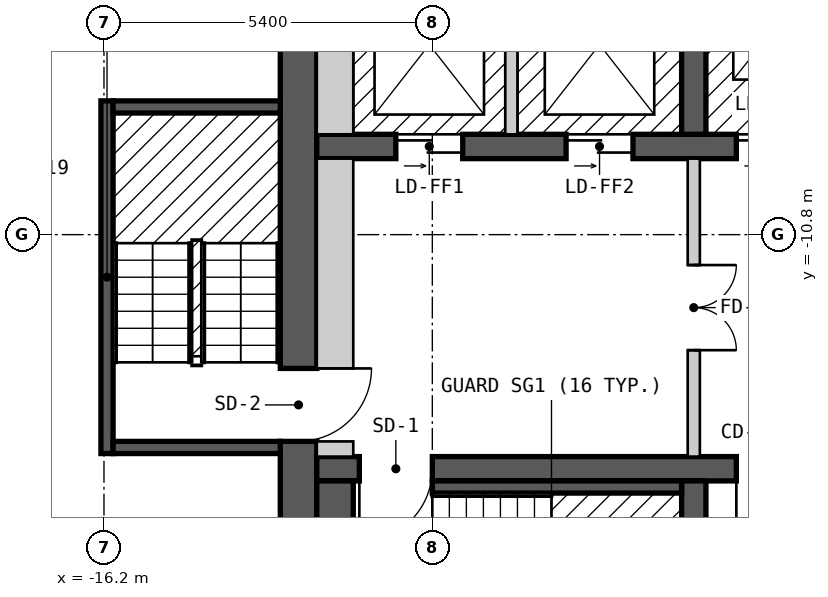
"""IFC4 building model, lengths in metres.
Left out: names, types, materials, properties, quantities, classifications, styles, units other than length and angle.
Written with IfcOpenShell. Run it as: python <this file> out.ifc"""

import sys

from ifc_helpers import new_model, si_unit, direction, frame, frame_2d, origin, origin_2d, place, context, subcontext, project, spatial, polyline, rectangle, outline, extrude, element, fill, save


model = new_model("IFC4")
c1 = context("Model", 3, precision=1e-05, world=origin(), true_north=direction((0.0, 1.0)))
c2 = subcontext(c1, "Body", "Model", "MODEL_VIEW")
j1 = project(units=[si_unit("LENGTHUNIT", "METRE"), si_unit("PLANEANGLEUNIT", "RADIAN")], contexts=[c1])
p1 = place(None, origin())
s1 = spatial("IfcSite", under=j1, at=p1, CompositionType="ELEMENT")
p2 = place(p1, origin())
s2 = spatial("IfcBuilding", under=s1, at=p2, CompositionType="ELEMENT")
p3 = place(p2, frame((0.0, 0.0, 172.2)))
s3 = spatial("IfcBuildingStorey", under=s2, at=p3, CompositionType="ELEMENT", Elevation=172.2)
p4 = place(p3, frame((-17.53, -15.736, 0.0), z_axis=(0.0, 0.0, 1.0), x_axis=(0.5, -0.866025403784, 0.0)))
e1 = element("IfcColumn", 1, at=p4, inside=s3, PredefinedType="COLUMN", context=c2, shape_type="SweptSolid", body=[
    extrude(rectangle(XDim=0.8, YDim=0.8, at=origin_2d()), origin(), (0.0, 0.0, 1.0), 3.0),
])
p5 = place(p3, frame((-13.0, -18.4, 0.0), z_axis=(0.0, 0.0, 1.0), x_axis=(0.0, 1.0, 0.0)))
e2 = element("IfcWall", 2, at=p5, inside=s3, PredefinedType="SHEAR", context=c2, shape_type="SweptSolid", body=[
    extrude(rectangle(XDim=12.8, YDim=0.6, at=frame_2d((6.4, 0.0))), origin(), (0.0, 0.0, 1.0), 2.7),
])
p6 = place(p5, frame((4.2, 0.0, 0.0)))
e3 = element("IfcOpeningElement", 3, at=p6, cuts=e2, PredefinedType="OPENING", context=c2, shape_type="SweptSolid", body=[
    extrude(rectangle(XDim=1.2, YDim=2.1, at=frame_2d((0.6, 1.05))), frame((0.0, 0.31, 0.0), z_axis=(0.0, -1.0, 0.0), x_axis=(1.0, 0.0, 0.0)), (0.0, 0.0, 1.0), 0.62),
])
p7 = place(p3, frame((-12.7, -14.65, 0.0), z_axis=(0.0, 0.0, 1.0), x_axis=(1.0, 0.0, 0.0)))
e4 = element("IfcWall", 4, at=p7, inside=s3, PredefinedType="SHEAR", context=c2, shape_type="SweptSolid", body=[
    extrude(rectangle(XDim=25.4, YDim=0.4, at=frame_2d((12.7, 0.0))), origin(), (0.0, 0.0, 1.0), 2.7),
])
p8 = place(p7, frame((1.9, 0.0, 0.0), z_axis=(0.0, 0.0, 1.0), x_axis=(-1.0, 0.0, 0.0)))
e5 = element("IfcOpeningElement", 5, at=p8, cuts=e4, PredefinedType="OPENING", context=c2, shape_type="SweptSolid", body=[
    extrude(rectangle(XDim=1.2, YDim=2.1, at=frame_2d((0.6, 1.05))), frame((0.0, 0.21, 0.0), z_axis=(0.0, -1.0, 0.0), x_axis=(1.0, 0.0, 0.0)), (0.0, 0.0, 1.0), 0.42),
])
p9 = place(p7, frame((24.75, 0.0, 0.0), z_axis=(0.0, 0.0, 1.0), x_axis=(-1.0, 0.0, 0.0)))
e6 = element("IfcOpeningElement", 6, at=p9, cuts=e4, PredefinedType="OPENING", context=c2, shape_type="SweptSolid", body=[
    extrude(rectangle(XDim=1.2, YDim=2.1, at=frame_2d((0.6, 1.05))), frame((0.0, 0.21, 0.0), z_axis=(0.0, -1.0, 0.0), x_axis=(1.0, 0.0, 0.0)), (0.0, 0.0, 1.0), 0.42),
])
p10 = place(p7, frame((7.8, 0.0, 0.0), z_axis=(0.0, 0.0, 1.0), x_axis=(-1.0, 0.0, 0.0)))
e7 = element("IfcOpeningElement", 7, at=p10, cuts=e4, PredefinedType="OPENING", context=c2, shape_type="SweptSolid", body=[
    extrude(rectangle(XDim=0.9, YDim=2.1, at=frame_2d((0.45, 1.05))), frame((0.0, 0.21, 0.0), z_axis=(0.0, -1.0, 0.0), x_axis=(1.0, 0.0, 0.0)), (0.0, 0.0, 1.0), 0.42),
])
p11 = place(p7, frame((9.85, 0.0, 0.0), z_axis=(0.0, 0.0, 1.0), x_axis=(-1.0, 0.0, 0.0)))
e8 = element("IfcOpeningElement", 8, at=p11, cuts=e4, PredefinedType="OPENING", context=c2, shape_type="SweptSolid", body=[
    extrude(rectangle(XDim=0.9, YDim=2.1, at=frame_2d((0.45, 1.05))), frame((0.0, 0.21, 0.0), z_axis=(0.0, -1.0, 0.0), x_axis=(1.0, 0.0, 0.0)), (0.0, 0.0, 1.0), 0.42),
])
p12 = place(p7, frame((12.15, 0.0, 0.0), z_axis=(0.0, 0.0, 1.0), x_axis=(-1.0, 0.0, 0.0)))
e9 = element("IfcOpeningElement", 9, at=p12, cuts=e4, PredefinedType="OPENING", context=c2, shape_type="SweptSolid", body=[
    extrude(rectangle(XDim=1.0, YDim=2.1, at=frame_2d((0.5, 1.05))), frame((0.0, 0.21, 0.0), z_axis=(0.0, -1.0, 0.0), x_axis=(1.0, 0.0, 0.0)), (0.0, 0.0, 1.0), 0.42),
])
p13 = place(p7, frame((14.35, 0.0, 0.0), z_axis=(0.0, 0.0, 1.0), x_axis=(-1.0, 0.0, 0.0)))
e10 = element("IfcOpeningElement", 10, at=p13, cuts=e4, PredefinedType="OPENING", context=c2, shape_type="SweptSolid", body=[
    extrude(rectangle(XDim=0.9, YDim=2.1, at=frame_2d((0.45, 1.05))), frame((0.0, 0.21, 0.0), z_axis=(0.0, -1.0, 0.0), x_axis=(1.0, 0.0, 0.0)), (0.0, 0.0, 1.0), 0.42),
])
p14 = place(p7, frame((16.35, 0.0, 0.0), z_axis=(0.0, 0.0, 1.0), x_axis=(-1.0, 0.0, 0.0)))
e11 = element("IfcOpeningElement", 11, at=p14, cuts=e4, PredefinedType="OPENING", context=c2, shape_type="SweptSolid", body=[
    extrude(rectangle(XDim=0.9, YDim=2.1, at=frame_2d((0.45, 1.05))), frame((0.0, 0.21, 0.0), z_axis=(0.0, -1.0, 0.0), x_axis=(1.0, 0.0, 0.0)), (0.0, 0.0, 1.0), 0.42),
])
p15 = place(p7, frame((18.5, 0.0, 0.0), z_axis=(0.0, 0.0, 1.0), x_axis=(-1.0, 0.0, 0.0)))
e12 = element("IfcOpeningElement", 12, at=p15, cuts=e4, PredefinedType="OPENING", context=c2, shape_type="SweptSolid", body=[
    extrude(rectangle(XDim=1.0, YDim=2.1, at=frame_2d((0.5, 1.05))), frame((0.0, 0.21, 0.0), z_axis=(0.0, -1.0, 0.0), x_axis=(1.0, 0.0, 0.0)), (0.0, 0.0, 1.0), 0.42),
])
p16 = place(p3, frame((-12.7, -9.35, 0.0), z_axis=(0.0, 0.0, 1.0), x_axis=(1.0, 0.0, 0.0)))
e13 = element("IfcWall", 13, at=p16, inside=s3, PredefinedType="SHEAR", context=c2, shape_type="SweptSolid", body=[
    extrude(rectangle(XDim=22.9, YDim=0.4, at=frame_2d((11.45, 0.0))), origin(), (0.0, 0.0, 1.0), 2.7),
])
p17 = place(p16, frame((1.3, 0.0, 0.0)))
e14 = element("IfcOpeningElement", 14, at=p17, cuts=e13, PredefinedType="OPENING", context=c2, shape_type="SweptSolid", body=[
    extrude(rectangle(XDim=1.1, YDim=2.1, at=frame_2d((0.55, 1.05))), frame((0.0, 0.21, 0.0), z_axis=(0.0, -1.0, 0.0), x_axis=(1.0, 0.0, 0.0)), (0.0, 0.0, 1.0), 0.42),
])
p18 = place(p16, frame((4.1, 0.0, 0.0)))
e15 = element("IfcOpeningElement", 15, at=p18, cuts=e13, PredefinedType="OPENING", context=c2, shape_type="SweptSolid", body=[
    extrude(rectangle(XDim=1.1, YDim=2.1, at=frame_2d((0.55, 1.05))), frame((0.0, 0.21, 0.0), z_axis=(0.0, -1.0, 0.0), x_axis=(1.0, 0.0, 0.0)), (0.0, 0.0, 1.0), 0.42),
])
p19 = place(p16, frame((6.9, 0.0, 0.0)))
e16 = element("IfcOpeningElement", 16, at=p19, cuts=e13, PredefinedType="OPENING", context=c2, shape_type="SweptSolid", body=[
    extrude(rectangle(XDim=1.1, YDim=2.1, at=frame_2d((0.55, 1.05))), frame((0.0, 0.21, 0.0), z_axis=(0.0, -1.0, 0.0), x_axis=(1.0, 0.0, 0.0)), (0.0, 0.0, 1.0), 0.42),
])
p20 = place(p16, frame((9.2, 0.0, 0.0)))
e17 = element("IfcOpeningElement", 17, at=p20, cuts=e13, PredefinedType="OPENING", context=c2, shape_type="SweptSolid", body=[
    extrude(rectangle(XDim=1.1, YDim=2.1, at=frame_2d((0.55, 1.05))), frame((0.0, 0.21, 0.0), z_axis=(0.0, -1.0, 0.0), x_axis=(1.0, 0.0, 0.0)), (0.0, 0.0, 1.0), 0.42),
])
p21 = place(p16, frame((11.5, 0.0, 0.0)))
e18 = element("IfcOpeningElement", 18, at=p21, cuts=e13, PredefinedType="OPENING", context=c2, shape_type="SweptSolid", body=[
    extrude(rectangle(XDim=1.1, YDim=2.1, at=frame_2d((0.55, 1.05))), frame((0.0, 0.21, 0.0), z_axis=(0.0, -1.0, 0.0), x_axis=(1.0, 0.0, 0.0)), (0.0, 0.0, 1.0), 0.42),
])
p22 = place(p16, frame((13.8, 0.0, 0.0)))
e19 = element("IfcOpeningElement", 19, at=p22, cuts=e13, PredefinedType="OPENING", context=c2, shape_type="SweptSolid", body=[
    extrude(rectangle(XDim=1.1, YDim=2.1, at=frame_2d((0.55, 1.05))), frame((0.0, 0.21, 0.0), z_axis=(0.0, -1.0, 0.0), x_axis=(1.0, 0.0, 0.0)), (0.0, 0.0, 1.0), 0.42),
])
p23 = place(p16, frame((16.1, 0.0, 0.0)))
e20 = element("IfcOpeningElement", 20, at=p23, cuts=e13, PredefinedType="OPENING", context=c2, shape_type="SweptSolid", body=[
    extrude(rectangle(XDim=1.1, YDim=2.1, at=frame_2d((0.55, 1.05))), frame((0.0, 0.21, 0.0), z_axis=(0.0, -1.0, 0.0), x_axis=(1.0, 0.0, 0.0)), (0.0, 0.0, 1.0), 0.42),
])
p24 = place(p16, frame((18.4, 0.0, 0.0)))
e21 = element("IfcOpeningElement", 21, at=p24, cuts=e13, PredefinedType="OPENING", context=c2, shape_type="SweptSolid", body=[
    extrude(rectangle(XDim=1.1, YDim=2.1, at=frame_2d((0.55, 1.05))), frame((0.0, 0.21, 0.0), z_axis=(0.0, -1.0, 0.0), x_axis=(1.0, 0.0, 0.0)), (0.0, 0.0, 1.0), 0.42),
])
p25 = place(p16, frame((20.8, 0.0, 0.0)))
e22 = element("IfcOpeningElement", 22, at=p25, cuts=e13, PredefinedType="OPENING", context=c2, shape_type="SweptSolid", body=[
    extrude(rectangle(XDim=1.1, YDim=2.1, at=frame_2d((0.55, 1.05))), frame((0.0, 0.21, 0.0), z_axis=(0.0, -1.0, 0.0), x_axis=(1.0, 0.0, 0.0)), (0.0, 0.0, 1.0), 0.42),
])
for number, where, z_axis, x_axis in (
    (23, (-6.5, -18.4, 0.0), (0.0, 0.0, 1.0), (0.0, 1.0, 0.0)),
    (24, (-6.5, -9.15, 0.0), (0.0, 0.0, 1.0), (0.0, 1.0, 0.0)),
):
    element("IfcWall", number, at=place(p3, frame(where, z_axis=z_axis, x_axis=x_axis)), inside=s3, PredefinedType="SHEAR", context=c2, shape_type="SweptSolid", body=[
        extrude(rectangle(XDim=3.55, YDim=0.4, at=frame_2d((1.775, 0.0))), origin(), (0.0, 0.0, 1.0), 2.7),
    ])
p26 = place(p3, frame((-26.024, -3.025, 0.0), z_axis=(0.0, 0.0, 1.0), x_axis=(0.500018670445, -0.86601462413, 0.0)))
e25 = element("IfcWall", 25, at=p26, inside=s3, PredefinedType="SOLIDWALL", context=c2, shape_type="SweptSolid", body=[
    extrude(outline(polyline([(0.0, -0.15), (20.785, -0.15), (20.705, 0.15), (0.08, 0.15), (0.0, -0.15)])), origin(), (0.0, 0.0, 1.0), 2.7),
])
p27 = place(p26, frame((1.13, 0.0, 0.15)))
e26 = element("IfcOpeningElement", 26, at=p27, cuts=e25, PredefinedType="OPENING", context=c2, shape_type="SweptSolid", body=[
    extrude(rectangle(XDim=1.5, YDim=2.1, at=frame_2d((0.75, 1.05))), frame((0.0, 0.16, 0.0), z_axis=(0.0, -1.0, 0.0), x_axis=(1.0, 0.0, 0.0)), (0.0, 0.0, 1.0), 0.32),
])
p28 = place(p26, frame((3.562, 0.0, 0.15)))
e27 = element("IfcOpeningElement", 27, at=p28, cuts=e25, PredefinedType="OPENING", context=c2, shape_type="SweptSolid", body=[
    extrude(rectangle(XDim=1.5, YDim=2.1, at=frame_2d((0.75, 1.05))), frame((0.0, 0.16, 0.0), z_axis=(0.0, -1.0, 0.0), x_axis=(1.0, 0.0, 0.0)), (0.0, 0.0, 1.0), 0.32),
])
p29 = place(p26, frame((5.994, 0.0, 0.15)))
e28 = element("IfcOpeningElement", 28, at=p29, cuts=e25, PredefinedType="OPENING", context=c2, shape_type="SweptSolid", body=[
    extrude(rectangle(XDim=1.5, YDim=2.1, at=frame_2d((0.75, 1.05))), frame((0.0, 0.16, 0.0), z_axis=(0.0, -1.0, 0.0), x_axis=(1.0, 0.0, 0.0)), (0.0, 0.0, 1.0), 0.32),
])
p30 = place(p26, frame((8.425, 0.0, 0.15)))
e29 = element("IfcOpeningElement", 29, at=p30, cuts=e25, PredefinedType="OPENING", context=c2, shape_type="SweptSolid", body=[
    extrude(rectangle(XDim=1.5, YDim=2.1, at=frame_2d((0.75, 1.05))), frame((0.0, 0.16, 0.0), z_axis=(0.0, -1.0, 0.0), x_axis=(1.0, 0.0, 0.0)), (0.0, 0.0, 1.0), 0.32),
])
p31 = place(p26, frame((10.857, 0.0, 0.15)))
e30 = element("IfcOpeningElement", 30, at=p31, cuts=e25, PredefinedType="OPENING", context=c2, shape_type="SweptSolid", body=[
    extrude(rectangle(XDim=1.5, YDim=2.1, at=frame_2d((0.75, 1.05))), frame((0.0, 0.16, 0.0), z_axis=(0.0, -1.0, 0.0), x_axis=(1.0, 0.0, 0.0)), (0.0, 0.0, 1.0), 0.32),
])
p32 = place(p26, frame((13.289, 0.0, 0.15)))
e31 = element("IfcOpeningElement", 31, at=p32, cuts=e25, PredefinedType="OPENING", context=c2, shape_type="SweptSolid", body=[
    extrude(rectangle(XDim=1.5, YDim=2.1, at=frame_2d((0.75, 1.05))), frame((0.0, 0.16, 0.0), z_axis=(0.0, -1.0, 0.0), x_axis=(1.0, 0.0, 0.0)), (0.0, 0.0, 1.0), 0.32),
])
p33 = place(p26, frame((15.722, 0.0, 0.15)))
e32 = element("IfcOpeningElement", 32, at=p33, cuts=e25, PredefinedType="OPENING", context=c2, shape_type="SweptSolid", body=[
    extrude(rectangle(XDim=1.5, YDim=2.1, at=frame_2d((0.75, 1.05))), frame((0.0, 0.16, 0.0), z_axis=(0.0, -1.0, 0.0), x_axis=(1.0, 0.0, 0.0)), (0.0, 0.0, 1.0), 0.32),
])
p34 = place(p26, frame((18.154, 0.0, 0.15)))
e33 = element("IfcOpeningElement", 33, at=p34, cuts=e25, PredefinedType="OPENING", context=c2, shape_type="SweptSolid", body=[
    extrude(rectangle(XDim=1.5, YDim=2.1, at=frame_2d((0.75, 1.05))), frame((0.0, 0.16, 0.0), z_axis=(0.0, -1.0, 0.0), x_axis=(1.0, 0.0, 0.0)), (0.0, 0.0, 1.0), 0.32),
])
p35 = place(p3, frame((-23.13, -7.737, 0.0), z_axis=(0.0, 0.0, 1.0), x_axis=(0.86598451299, 0.500070818246, 0.0)))
e34 = element("IfcWall", 34, at=p35, inside=s3, PredefinedType="PARTITIONING", context=c2, shape_type="SweptSolid", body=[
    extrude(rectangle(XDim=8.695, YDim=0.2, at=frame_2d((4.348, 0.0))), origin(), (0.0, 0.0, 1.0), 2.7),
])
p36 = place(p3, frame((-16.15, -14.4, 0.0), z_axis=(0.0, 0.0, 1.0), x_axis=(0.0, 1.0, 0.0)))
e35 = element("IfcWall", 35, at=p36, inside=s3, PredefinedType="SOLIDWALL", context=c2, shape_type="SweptSolid", body=[
    extrude(rectangle(XDim=5.8, YDim=0.2, at=frame_2d((2.9, 0.0))), origin(), (0.0, 0.0, 1.0), 2.7),
])
for number, where, z_axis, x_axis in (
    (36, (-16.05, -14.3, 0.0), (0.0, 0.0, 1.0), (1.0, 0.0, 0.0)),
    (37, (-16.05, -8.7, 0.0), (0.0, 0.0, 1.0), (1.0, 0.0, 0.0)),
):
    element("IfcWall", number, at=place(p3, frame(where, z_axis=z_axis, x_axis=x_axis)), inside=s3, PredefinedType="SOLIDWALL", context=c2, shape_type="SweptSolid", body=[
        extrude(rectangle(XDim=2.75, YDim=0.2, at=frame_2d((1.375, 0.0))), origin(), (0.0, 0.0, 1.0), 2.7),
    ])
p37 = place(p3, frame((-12.4, -18.4, 0.0), z_axis=(0.0, 0.0, 1.0), x_axis=(0.0, 1.0, 0.0)))
e38 = element("IfcWall", 38, at=p37, inside=s3, PredefinedType="SOLIDWALL", context=c2, shape_type="SweptSolid", body=[
    extrude(rectangle(XDim=3.55, YDim=0.6, at=frame_2d((1.775, 0.0))), origin(), (0.0, 0.0, 1.0), 2.7),
])
p38 = place(p3, frame((-12.7, -14.325, 0.0), z_axis=(0.0, 0.0, 1.0), x_axis=(1.0, 0.0, 0.0)))
e39 = element("IfcWall", 39, at=p38, inside=s3, PredefinedType="PARTITIONING", context=c2, shape_type="SweptSolid", body=[
    extrude(rectangle(XDim=0.6, YDim=0.25, at=frame_2d((0.3, 0.0))), origin(), (0.0, 0.0, 1.0), 2.7),
])
p39 = place(p3, frame((-12.4, -13.0, 0.0), z_axis=(0.0, 0.0, 1.0), x_axis=(0.0, 1.0, 0.0)))
e40 = element("IfcWall", 40, at=p39, inside=s3, PredefinedType="PARTITIONING", context=c2, shape_type="SweptSolid", body=[
    extrude(rectangle(XDim=3.45, YDim=0.6, at=frame_2d((1.725, 0.0))), origin(), (0.0, 0.0, 1.0), 2.7),
])
p40 = place(p3, frame((-12.4, -9.15, 0.0), z_axis=(0.0, 0.0, 1.0), x_axis=(0.0, 1.0, 0.0)))
e41 = element("IfcWall", 41, at=p40, inside=s3, PredefinedType="SOLIDWALL", context=c2, shape_type="SweptSolid", body=[
    extrude(rectangle(XDim=3.55, YDim=0.6, at=frame_2d((1.775, 0.0))), origin(), (0.0, 0.0, 1.0), 2.7),
])
p41 = place(p3, frame((-10.8, -14.95, 0.0), z_axis=(0.0, 0.0, 1.0), x_axis=(1.0, 0.0, 0.0)))
e42 = element("IfcWall", 42, at=p41, inside=s3, PredefinedType="SOLIDWALL", context=c2, shape_type="SweptSolid", body=[
    extrude(rectangle(XDim=4.1, YDim=0.2, at=frame_2d((2.05, 0.0))), origin(), (0.0, 0.0, 1.0), 2.7),
])
p42 = place(p3, frame((-9.5, -9.15, 0.0), z_axis=(0.0, 0.0, 1.0), x_axis=(0.0, 1.0, 0.0)))
e43 = element("IfcWall", 43, at=p42, inside=s3, PredefinedType="SOLIDWALL", context=c2, shape_type="SweptSolid", body=[
    extrude(rectangle(XDim=2.95, YDim=0.2, at=frame_2d((1.475, 0.0))), origin(), (0.0, 0.0, 1.0), 2.7),
])
p43 = place(p3, frame((-6.5, -14.45, 0.0), z_axis=(0.0, 0.0, 1.0), x_axis=(0.0, 1.0, 0.0)))
e44 = element("IfcWall", 44, at=p43, inside=s3, PredefinedType="PARTITIONING", context=c2, shape_type="SweptSolid", body=[
    extrude(rectangle(XDim=4.9, YDim=0.2, at=frame_2d((2.45, 0.0))), origin(), (0.0, 0.0, 1.0), 2.7),
])
p44 = place(p43, frame((3.15, 0.0, 0.0), z_axis=(0.0, 0.0, 1.0), x_axis=(-1.0, 0.0, 0.0)))
e45 = element("IfcOpeningElement", 45, at=p44, cuts=e44, PredefinedType="OPENING", context=c2, shape_type="SweptSolid", body=[
    extrude(rectangle(XDim=1.4, YDim=2.1, at=frame_2d((0.7, 1.05))), frame((0.0, 0.11, 0.0), z_axis=(0.0, -1.0, 0.0), x_axis=(1.0, 0.0, 0.0)), (0.0, 0.0, 1.0), 0.22),
])
p45 = place(p17, origin())
e46 = element("IfcDoor", 46, at=p45, inside=s3, OperationType="DOUBLE_DOOR_SLIDING", PredefinedType="DOOR", context=c2, shape_type="SweptSolid", body=[
    extrude(rectangle(XDim=1.1, YDim=2.1, at=frame_2d((0.55, 1.05))), frame((0.0, 0.025, 0.0), z_axis=(0.0, -1.0, 0.0), x_axis=(1.0, 0.0, 0.0)), (0.0, 0.0, 1.0), 0.05),
])
fill(e14, e46)
p46 = place(p18, origin())
e47 = element("IfcDoor", 47, at=p46, inside=s3, OperationType="DOUBLE_DOOR_SLIDING", PredefinedType="DOOR", context=c2, shape_type="SweptSolid", body=[
    extrude(rectangle(XDim=1.1, YDim=2.1, at=frame_2d((0.55, 1.05))), frame((0.0, 0.025, 0.0), z_axis=(0.0, -1.0, 0.0), x_axis=(1.0, 0.0, 0.0)), (0.0, 0.0, 1.0), 0.05),
])
fill(e15, e47)
p47 = place(p19, origin())
e48 = element("IfcDoor", 48, at=p47, inside=s3, OperationType="DOUBLE_DOOR_SLIDING", PredefinedType="DOOR", context=c2, shape_type="SweptSolid", body=[
    extrude(rectangle(XDim=1.1, YDim=2.1, at=frame_2d((0.55, 1.05))), frame((0.0, 0.025, 0.0), z_axis=(0.0, -1.0, 0.0), x_axis=(1.0, 0.0, 0.0)), (0.0, 0.0, 1.0), 0.05),
])
fill(e16, e48)
p48 = place(p8, origin())
e49 = element("IfcDoor", 49, at=p48, inside=s3, OperationType="SINGLE_SWING_RIGHT", PredefinedType="DOOR", context=c2, shape_type="SweptSolid", body=[
    extrude(rectangle(XDim=1.2, YDim=2.1, at=frame_2d((0.6, 1.05))), frame((0.0, 0.025, 0.0), z_axis=(0.0, -1.0, 0.0), x_axis=(1.0, 0.0, 0.0)), (0.0, 0.0, 1.0), 0.05),
])
fill(e5, e49)
p49 = place(p6, origin())
e50 = element("IfcDoor", 50, at=p49, inside=s3, OperationType="SINGLE_SWING_RIGHT", PredefinedType="DOOR", context=c2, shape_type="SweptSolid", body=[
    extrude(rectangle(XDim=1.2, YDim=2.1, at=frame_2d((0.6, 1.05))), frame((0.0, 0.025, 0.0), z_axis=(0.0, -1.0, 0.0), x_axis=(1.0, 0.0, 0.0)), (0.0, 0.0, 1.0), 0.05),
])
fill(e3, e50)
p50 = place(p44, origin())
e51 = element("IfcDoor", 51, at=p50, inside=s3, OperationType="DOUBLE_DOOR_SINGLE_SWING", PredefinedType="DOOR", context=c2, shape_type="SweptSolid", body=[
    extrude(rectangle(XDim=1.4, YDim=2.1, at=frame_2d((0.7, 1.05))), frame((0.0, 0.025, 0.0), z_axis=(0.0, -1.0, 0.0), x_axis=(1.0, 0.0, 0.0)), (0.0, 0.0, 1.0), 0.05),
])
fill(e45, e51)
p51 = place(p10, origin())
e52 = element("IfcDoor", 52, at=p51, inside=s3, OperationType="SINGLE_SWING_RIGHT", PredefinedType="DOOR", context=c2, shape_type="SweptSolid", body=[
    extrude(rectangle(XDim=0.9, YDim=2.1, at=frame_2d((0.45, 1.05))), frame((0.0, 0.025, 0.0), z_axis=(0.0, -1.0, 0.0), x_axis=(1.0, 0.0, 0.0)), (0.0, 0.0, 1.0), 0.05),
])
fill(e7, e52)
save(model, sys.argv[1])
